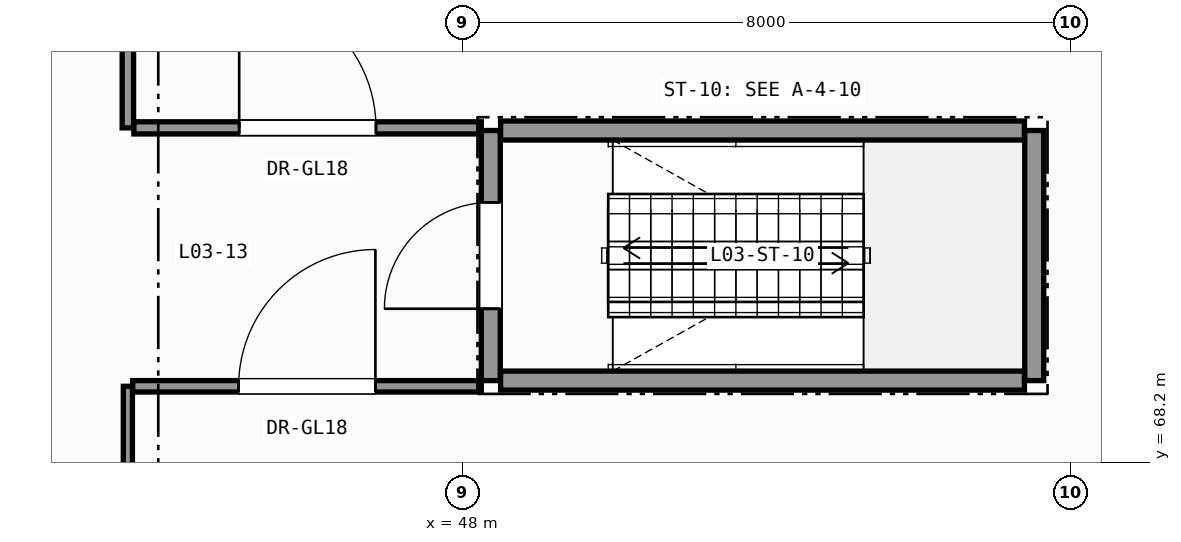
"""IFC4 building model, lengths in metres.
Left out: names, types, materials, properties, quantities, classifications, styles, units other than length and angle.
Written with IfcOpenShell. Run it as: python <this file> out.ifc"""

import sys

from ifc_helpers import new_model, si_unit, direction, frame, frame_2d, origin, place, context, subcontext, project, spatial, rectangle, extrude, element, fill, save


model = new_model("IFC4")
c1 = context("Model", 3, precision=1e-05, world=origin(), true_north=direction((0.0, 1.0)))
c2 = subcontext(c1, "Body", "Model", "MODEL_VIEW")
j1 = project(units=[si_unit("LENGTHUNIT", "METRE"), si_unit("PLANEANGLEUNIT", "RADIAN")], contexts=[c1])
p1 = place(None, origin())
s1 = spatial("IfcSite", under=j1, at=p1, CompositionType="ELEMENT")
p2 = place(p1, origin())
s2 = spatial("IfcBuilding", under=s1, at=p2, CompositionType="ELEMENT")
p3 = place(p2, frame((0.0, 0.0, 13.2)))
s3 = spatial("IfcBuildingStorey", under=s2, at=p3, CompositionType="ELEMENT", Elevation=13.2)
p4 = place(p3, frame((48.375, 69.275, 0.0), z_axis=(0.0, 0.0, 1.0), x_axis=(0.0, 1.0, 0.0)))
e1 = element("IfcWall", 1, at=p4, inside=s3, PredefinedType="SHEAR", context=c2, shape_type="SweptSolid", body=[
    extrude(rectangle(XDim=3.29, YDim=0.25, at=frame_2d((1.645, 0.0))), origin(), (0.0, 0.0, 1.0), 4.56),
])
p5 = place(p4, frame((0.945, 0.0, 0.0)))
e2 = element("IfcOpeningElement", 2, at=p5, cuts=e1, PredefinedType="OPENING", context=c2, shape_type="SweptSolid", body=[
    extrude(rectangle(XDim=1.4, YDim=2.2, at=frame_2d((0.7, 1.1))), frame((0.0, 0.135, 0.0), z_axis=(0.0, -1.0, 0.0), x_axis=(1.0, 0.0, 0.0)), (0.0, 0.0, 1.0), 0.27),
])
p6 = place(p3, frame((55.525, 69.275, 0.0), z_axis=(0.0, 0.0, 1.0), x_axis=(0.0, 1.0, 0.0)))
e3 = element("IfcWall", 3, at=p6, inside=s3, PredefinedType="SHEAR", context=c2, shape_type="SweptSolid", body=[
    extrude(rectangle(XDim=3.29, YDim=0.25, at=frame_2d((1.645, 0.0))), origin(), (0.0, 0.0, 1.0), 4.56),
])
for number, where, z_axis, x_axis in (
    (4, (48.504, 69.275, 0.0), (0.0, 0.0, 1.0), (1.0, 0.0, 0.0)),
    (5, (48.504, 72.565, 0.0), (0.0, 0.0, 1.0), (1.0, 0.0, 0.0)),
):
    element("IfcWall", number, at=place(p3, frame(where, z_axis=z_axis, x_axis=x_axis)), inside=s3, PredefinedType="SHEAR", context=c2, shape_type="SweptSolid", body=[
        extrude(rectangle(XDim=6.892, YDim=0.25, at=frame_2d((3.446, 0.0))), origin(), (0.0, 0.0, 1.0), 4.56),
    ])
p7 = place(p3, frame((43.6, 72.6, 0.0), z_axis=(0.0, 0.0, 1.0), x_axis=(0.0, 1.0, 0.0)))
e6 = element("IfcWall", 6, at=p7, inside=s3, PredefinedType="PARTITIONING", context=c2, shape_type="SweptSolid", body=[
    extrude(rectangle(XDim=10.8, YDim=0.15, at=frame_2d((5.4, 0.0))), origin(), (0.0, 0.0, 1.0), 4.56),
])
p8 = place(p7, frame((4.3, 0.0, 0.0)))
e7 = element("IfcOpeningElement", 7, at=p8, cuts=e6, PredefinedType="OPENING", context=c2, shape_type="SweptSolid", body=[
    extrude(rectangle(XDim=2.2, YDim=2.6, at=frame_2d((1.1, 1.3))), frame((0.0, 0.085, 0.0), z_axis=(0.0, -1.0, 0.0), x_axis=(1.0, 0.0, 0.0)), (0.0, 0.0, 1.0), 0.17),
])
p9 = place(p3, frame((43.6, 61.464, 0.0), z_axis=(0.0, 0.0, 1.0), x_axis=(0.0, 1.0, 0.0)))
e8 = element("IfcWall", 8, at=p9, inside=s3, PredefinedType="PARTITIONING", context=c2, shape_type="SweptSolid", body=[
    extrude(rectangle(XDim=7.736, YDim=0.12, at=frame_2d((3.868, 0.0))), origin(), (0.0, 0.0, 1.0), 4.56),
])
p10 = place(p9, frame((2.768, 0.0, 0.0)))
e9 = element("IfcOpeningElement", 9, at=p10, cuts=e8, PredefinedType="OPENING", context=c2, shape_type="SweptSolid", body=[
    extrude(rectangle(XDim=2.2, YDim=2.6, at=frame_2d((1.1, 1.3))), frame((0.0, 0.07, 0.0), z_axis=(0.0, -1.0, 0.0), x_axis=(1.0, 0.0, 0.0)), (0.0, 0.0, 1.0), 0.14),
])
p11 = place(p3, frame((43.679, 72.6, 0.0), z_axis=(0.0, 0.0, 1.0), x_axis=(1.0, 0.0, 0.0)))
e10 = element("IfcWall", 10, at=p11, inside=s3, PredefinedType="PARTITIONING", context=c2, shape_type="SweptSolid", body=[
    extrude(rectangle(XDim=4.571, YDim=0.16, at=frame_2d((2.286, 0.0))), origin(), (0.0, 0.0, 1.0), 4.56),
])
p12 = place(p11, frame((1.385, 0.0, 0.0)))
e11 = element("IfcOpeningElement", 11, at=p12, cuts=e10, PredefinedType="OPENING", context=c2, shape_type="SweptSolid", body=[
    extrude(rectangle(XDim=1.8, YDim=2.4, at=frame_2d((0.9, 1.2))), frame((0.0, 0.09, 0.0), z_axis=(0.0, -1.0, 0.0), x_axis=(1.0, 0.0, 0.0)), (0.0, 0.0, 1.0), 0.18),
])
p13 = place(p3, frame((43.664, 69.2, 0.0), z_axis=(0.0, 0.0, 1.0), x_axis=(1.0, 0.0, 0.0)))
e12 = element("IfcWall", 12, at=p13, inside=s3, PredefinedType="PARTITIONING", context=c2, shape_type="SweptSolid", body=[
    extrude(rectangle(XDim=4.586, YDim=0.15, at=frame_2d((2.293, 0.0))), origin(), (0.0, 0.0, 1.0), 4.56),
])
p14 = place(p13, frame((1.393, 0.0, 0.0)))
e13 = element("IfcOpeningElement", 13, at=p14, cuts=e12, PredefinedType="OPENING", context=c2, shape_type="SweptSolid", body=[
    extrude(rectangle(XDim=1.8, YDim=2.4, at=frame_2d((0.9, 1.2))), frame((0.0, 0.085, 0.0), z_axis=(0.0, -1.0, 0.0), x_axis=(1.0, 0.0, 0.0)), (0.0, 0.0, 1.0), 0.17),
])
p15 = place(p5, origin())
e14 = element("IfcDoor", 14, at=p15, inside=s3, OperationType="SINGLE_SWING_LEFT", PredefinedType="DOOR", context=c2, shape_type="SweptSolid", body=[
    extrude(rectangle(XDim=1.4, YDim=2.2, at=frame_2d((0.7, 1.1))), frame((0.0, 0.025, 0.0), z_axis=(0.0, -1.0, 0.0), x_axis=(1.0, 0.0, 0.0)), (0.0, 0.0, 1.0), 0.05),
])
fill(e2, e14)
p16 = place(p12, origin())
e15 = element("IfcDoor", 15, at=p16, inside=s3, OperationType="SINGLE_SWING_LEFT", PredefinedType="DOOR", context=c2, shape_type="SweptSolid", body=[
    extrude(rectangle(XDim=1.8, YDim=2.4, at=frame_2d((0.9, 1.2))), frame((0.0, 0.025, 0.0), z_axis=(0.0, -1.0, 0.0), x_axis=(1.0, 0.0, 0.0)), (0.0, 0.0, 1.0), 0.05),
])
fill(e11, e15)
p17 = place(p14, origin())
e16 = element("IfcDoor", 16, at=p17, inside=s3, OperationType="SINGLE_SWING_RIGHT", PredefinedType="DOOR", context=c2, shape_type="SweptSolid", body=[
    extrude(rectangle(XDim=1.8, YDim=2.4, at=frame_2d((0.9, 1.2))), frame((0.0, 0.025, 0.0), z_axis=(0.0, -1.0, 0.0), x_axis=(1.0, 0.0, 0.0)), (0.0, 0.0, 1.0), 0.05),
])
fill(e13, e16)
save(model, sys.argv[1])
